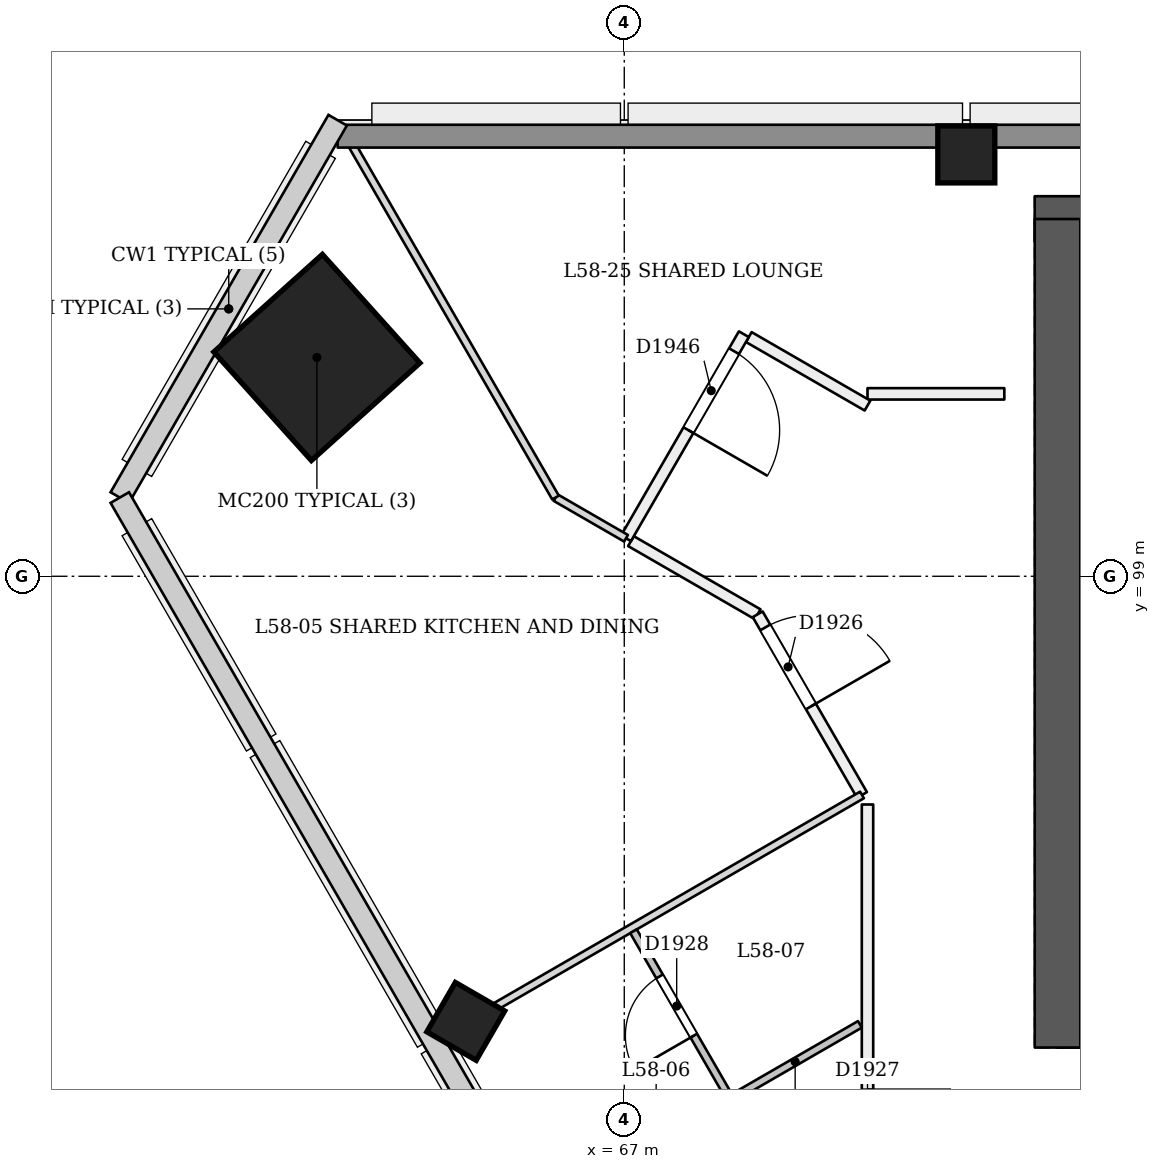
"""IFC4 building model, lengths in metres.
Left out: names, types, materials, properties, quantities, classifications, styles, units other than length and angle.
Written with IfcOpenShell. Run it as: python <this file> out.ifc"""

import sys

from ifc_helpers import new_model, si_unit, direction, frame, frame_2d, origin, origin_2d, place, context, subcontext, project, spatial, rectangle, extrude, element, fill, save


model = new_model("IFC4")
c1 = context("Model", 3, precision=1e-05, world=origin(), true_north=direction((0.0, 1.0)))
c2 = subcontext(c1, "Body", "Model", "MODEL_VIEW")
j1 = project(units=[si_unit("LENGTHUNIT", "METRE"), si_unit("PLANEANGLEUNIT", "RADIAN")], contexts=[c1])
p1 = place(None, origin())
s1 = spatial("IfcSite", under=j1, at=p1, CompositionType="ELEMENT")
p2 = place(p1, origin())
s2 = spatial("IfcBuilding", under=s1, at=p2, CompositionType="ELEMENT")
p3 = place(p2, frame((0.0, 0.0, 226.6)))
s3 = spatial("IfcBuildingStorey", under=s2, at=p3, CompositionType="ELEMENT", Elevation=226.6)
p4 = place(p3, frame((72.7, 93.1, 0.0), z_axis=(0.0, 0.0, 1.0), x_axis=(1.0, 0.0, 0.0)))
e1 = element("IfcWall", 1, at=p4, inside=s3, PredefinedType="SHEAR", context=c2, shape_type="SweptSolid", body=[
    extrude(rectangle(XDim=24.9, YDim=0.6, at=frame_2d((12.45, 0.0))), origin(), (0.0, 0.0, 1.0), 3.6),
])
p5 = place(p4, frame((1.1, 0.0, 0.0)))
e2 = element("IfcOpeningElement", 2, at=p5, cuts=e1, PredefinedType="OPENING", context=c2, shape_type="SweptSolid", body=[
    extrude(rectangle(XDim=1.2, YDim=2.1, at=frame_2d((0.6, 1.05))), frame((0.0, 0.311, 0.0), z_axis=(0.0, -1.0, 0.0), x_axis=(1.0, 0.0, 0.0)), (0.0, 0.0, 1.0), 0.621),
])
p6 = place(p4, frame((3.3, 0.0, 0.0)))
e3 = element("IfcOpeningElement", 3, at=p6, cuts=e1, PredefinedType="OPENING", context=c2, shape_type="SweptSolid", body=[
    extrude(rectangle(XDim=1.2, YDim=2.1, at=frame_2d((0.6, 1.05))), frame((0.0, 0.311, 0.0), z_axis=(0.0, -1.0, 0.0), x_axis=(1.0, 0.0, 0.0)), (0.0, 0.0, 1.0), 0.621),
])
p7 = place(p4, frame((13.3, 0.0, 0.0)))
e4 = element("IfcOpeningElement", 4, at=p7, cuts=e1, PredefinedType="OPENING", context=c2, shape_type="SweptSolid", body=[
    extrude(rectangle(XDim=1.2, YDim=2.1, at=frame_2d((0.6, 1.05))), frame((0.0, 0.311, 0.0), z_axis=(0.0, -1.0, 0.0), x_axis=(1.0, 0.0, 0.0)), (0.0, 0.0, 1.0), 0.621),
])
p8 = place(p4, frame((15.762, 0.0, 0.0)))
e5 = element("IfcOpeningElement", 5, at=p8, cuts=e1, PredefinedType="OPENING", context=c2, shape_type="SweptSolid", body=[
    extrude(rectangle(XDim=1.0, YDim=2.1, at=frame_2d((0.5, 1.05))), frame((0.0, 0.311, 0.0), z_axis=(0.0, -1.0, 0.0), x_axis=(1.0, 0.0, 0.0)), (0.0, 0.0, 1.0), 0.621),
])
p9 = place(p4, frame((18.2, 0.0, 0.0)))
e6 = element("IfcOpeningElement", 6, at=p9, cuts=e1, PredefinedType="OPENING", context=c2, shape_type="SweptSolid", body=[
    extrude(rectangle(XDim=1.0, YDim=2.1, at=frame_2d((0.5, 1.05))), frame((0.0, 0.311, 0.0), z_axis=(0.0, -1.0, 0.0), x_axis=(1.0, 0.0, 0.0)), (0.0, 0.0, 1.0), 0.621),
])
p10 = place(p4, frame((20.55, 0.0, 0.0)))
e7 = element("IfcOpeningElement", 7, at=p10, cuts=e1, PredefinedType="OPENING", context=c2, shape_type="SweptSolid", body=[
    extrude(rectangle(XDim=1.0, YDim=2.1, at=frame_2d((0.5, 1.05))), frame((0.0, 0.311, 0.0), z_axis=(0.0, -1.0, 0.0), x_axis=(1.0, 0.0, 0.0)), (0.0, 0.0, 1.0), 0.621),
])
p11 = place(p4, frame((22.837, 0.0, 0.0)))
e8 = element("IfcOpeningElement", 8, at=p11, cuts=e1, PredefinedType="OPENING", context=c2, shape_type="SweptSolid", body=[
    extrude(rectangle(XDim=1.0, YDim=2.1, at=frame_2d((0.5, 1.05))), frame((0.0, 0.311, 0.0), z_axis=(0.0, -1.0, 0.0), x_axis=(1.0, 0.0, 0.0)), (0.0, 0.0, 1.0), 0.621),
])
p12 = place(p3, frame((97.3, 103.7, 0.0), z_axis=(0.0, 0.0, 1.0), x_axis=(-1.0, 0.0, 0.0)))
e9 = element("IfcWall", 9, at=p12, inside=s3, PredefinedType="SHEAR", context=c2, shape_type="SweptSolid", body=[
    extrude(rectangle(XDim=24.9, YDim=0.6, at=frame_2d((12.45, 0.0))), origin(), (0.0, 0.0, 1.0), 3.6),
])
p13 = place(p3, frame((72.7, 103.7, 0.0), z_axis=(0.0, 0.0, 1.0), x_axis=(0.0, -1.0, 0.0)))
e10 = element("IfcWall", 10, at=p13, inside=s3, PredefinedType="SHEAR", context=c2, shape_type="SweptSolid", body=[
    extrude(rectangle(XDim=10.9, YDim=0.6, at=frame_2d((5.45, 0.0))), origin(), (0.0, 0.0, 1.0), 3.6),
])
p14 = place(p3, frame((62.922, 101.868, 0.0), z_axis=(0.028403721265, 0.009287135593, 0.999553389135), x_axis=(-0.866201877506, 0.49929479911, 0.019975259356)))
e11 = element("IfcColumn", 11, at=p14, inside=s3, PredefinedType="COLUMN", context=c2, shape_type="SweptSolid", body=[
    extrude(rectangle(XDim=1.92, YDim=1.92, at=origin_2d()), origin(), (0.0, 0.0, 1.0), 3.602),
])
p15 = place(p3, frame((71.5, 104.55, 0.0), z_axis=(0.0, 0.0, 1.0), x_axis=(1.0, 0.0, 0.0)))
e12 = element("IfcColumn", 12, at=p15, inside=s3, PredefinedType="COLUMN", context=c2, shape_type="SweptSolid", body=[
    extrude(rectangle(XDim=0.75, YDim=0.75, at=origin_2d()), origin(), (0.0, 0.0, 1.0), 3.6),
])
p16 = place(p3, frame((64.888, 93.097, -0.023), z_axis=(0.02215369191, 0.038413282303, 0.999016333038), x_axis=(-0.865361987983, -0.499673744646, 0.038402847096)))
e13 = element("IfcColumn", 13, at=p16, inside=s3, PredefinedType="COLUMN", context=c2, shape_type="SweptSolid", body=[
    extrude(rectangle(XDim=0.75, YDim=0.75, at=origin_2d()), origin(), (0.0, 0.0, 1.0), 3.604),
])
p17 = place(p3, frame((67.088, 99.462, 0.0), z_axis=(0.0, 0.0, 1.0), x_axis=(0.866033512162, -0.499985955615, 0.0)))
e14 = element("IfcWall", 14, at=p17, inside=s3, PredefinedType="PARTITIONING", context=c2, shape_type="SweptSolid", body=[
    extrude(rectangle(XDim=1.925, YDim=0.15, at=frame_2d((0.962, 0.0))), origin(), (0.0, 0.0, 1.0), 3.2),
])
p18 = place(p3, frame((68.755, 98.5, 0.0), z_axis=(0.0, 0.0, 1.0), x_axis=(0.500061224174, -0.865990053105, 0.0)))
e15 = element("IfcWall", 15, at=p18, inside=s3, PredefinedType="PARTITIONING", context=c2, shape_type="SweptSolid", body=[
    extrude(rectangle(XDim=2.745, YDim=0.15, at=frame_2d((1.373, 0.0))), origin(), (0.0, 0.0, 1.0), 3.2),
])
p19 = place(p18, frame((0.2, 0.0, 0.0)))
e16 = element("IfcOpeningElement", 16, at=p19, cuts=e15, PredefinedType="OPENING", context=c2, shape_type="SweptSolid", body=[
    extrude(rectangle(XDim=1.2, YDim=2.1, at=frame_2d((0.6, 1.05))), frame((0.0, 0.085, 0.0), z_axis=(0.0, -1.0, 0.0), x_axis=(1.0, 0.0, 0.0)), (0.0, 0.0, 1.0), 0.171),
])
p20 = place(p3, frame((70.2, 95.998, 0.0), z_axis=(0.0, 0.0, 1.0), x_axis=(0.0, -1.0, 0.0)))
e17 = element("IfcWall", 17, at=p20, inside=s3, PredefinedType="PARTITIONING", context=c2, shape_type="SweptSolid", body=[
    extrude(rectangle(XDim=5.798, YDim=0.15, at=frame_2d((2.899, 0.0))), origin(), (0.0, 0.0, 1.0), 3.2),
])
p21 = place(p20, frame((3.752, 0.0, 0.0)))
e18 = element("IfcOpeningElement", 18, at=p21, cuts=e17, PredefinedType="OPENING", context=c2, shape_type="SweptSolid", body=[
    extrude(rectangle(XDim=1.1, YDim=2.1, at=frame_2d((0.55, 1.05))), frame((0.0, 0.085, 0.0), z_axis=(0.0, -1.0, 0.0), x_axis=(1.0, 0.0, 0.0)), (0.0, 0.0, 1.0), 0.171),
])
p22 = place(p3, frame((72.0, 101.4, 0.0), z_axis=(0.0, 0.0, 1.0), x_axis=(-1.0, 0.0, 0.0)))
e19 = element("IfcWall", 19, at=p22, inside=s3, PredefinedType="PARTITIONING", context=c2, shape_type="SweptSolid", body=[
    extrude(rectangle(XDim=1.8, YDim=0.15, at=frame_2d((0.9, 0.0))), origin(), (0.0, 0.0, 1.0), 3.2),
])
p23 = place(p3, frame((70.2, 101.245, 0.0), z_axis=(0.0, 0.0, 1.0), x_axis=(-0.865984934964, 0.500070087503, 0.0)))
e20 = element("IfcWall", 20, at=p23, inside=s3, PredefinedType="PARTITIONING", context=c2, shape_type="SweptSolid", body=[
    extrude(rectangle(XDim=1.803, YDim=0.15, at=frame_2d((0.902, 0.0))), origin(), (0.0, 0.0, 1.0), 3.2),
])
p24 = place(p3, frame((68.573, 102.185, 0.0), z_axis=(0.0, 0.0, 1.0), x_axis=(-0.500026960575, -0.86600983753, 0.0)))
e21 = element("IfcWall", 21, at=p24, inside=s3, PredefinedType="PARTITIONING", context=c2, shape_type="SweptSolid", body=[
    extrude(rectangle(XDim=3.1, YDim=0.15, at=frame_2d((1.55, 0.0))), origin(), (0.0, 0.0, 1.0), 3.2),
])
p25 = place(p24, frame((0.258, 0.0, 0.0)))
e22 = element("IfcOpeningElement", 22, at=p25, cuts=e21, PredefinedType="OPENING", context=c2, shape_type="SweptSolid", body=[
    extrude(rectangle(XDim=1.2, YDim=2.1, at=frame_2d((0.6, 1.05))), frame((0.0, 0.085, 0.0), z_axis=(0.0, -1.0, 0.0), x_axis=(1.0, 0.0, 0.0)), (0.0, 0.0, 1.0), 0.171),
])
p26 = place(p3, frame((64.585, 92.923, 0.0), z_axis=(0.0, 0.0, 1.0), x_axis=(0.866018518567, 0.500011925357, 0.0)))
e23 = element("IfcWall", 23, at=p26, inside=s3, PredefinedType="PARTITIONING", context=c2, shape_type="SweptSolid", body=[
    extrude(rectangle(XDim=6.4, YDim=0.1, at=frame_2d((3.2, 0.0))), origin(), (0.0, 0.0, 1.0), 2.7),
])
p27 = place(p3, frame((67.023, 99.5, 0.0), z_axis=(0.0, 0.0, 1.0), x_axis=(-0.866018596809, 0.500011789842, 0.0)))
e24 = element("IfcWall", 24, at=p27, inside=s3, PredefinedType="PARTITIONING", context=c2, shape_type="SweptSolid", body=[
    extrude(rectangle(XDim=1.071, YDim=0.1, at=frame_2d((0.536, 0.0))), origin(), (0.0, 0.0, 1.0), 3.2),
])
p28 = place(p3, frame((66.095, 100.036, 0.0), z_axis=(0.0, 0.0, 1.0), x_axis=(-0.49999586752, 0.86602778966, 0.0)))
e25 = element("IfcWall", 25, at=p28, inside=s3, PredefinedType="PARTITIONING", context=c2, shape_type="SweptSolid", body=[
    extrude(rectangle(XDim=5.617, YDim=0.1, at=frame_2d((2.808, 0.0))), origin(), (0.0, 0.0, 1.0), 2.7),
])
p29 = place(p3, frame((70.1, 93.105, 0.0), z_axis=(0.0, 0.0, 1.0), x_axis=(-0.866065717678, -0.499930167786, 0.0)))
e26 = element("IfcWall", 26, at=p29, inside=s3, PredefinedType="PARTITIONING", context=c2, shape_type="SweptSolid", body=[
    extrude(rectangle(XDim=1.967, YDim=0.1, at=frame_2d((0.983, 0.0))), origin(), (0.0, 0.0, 1.0), 3.2),
])
p30 = place(p3, frame((68.396, 92.121, 0.0), z_axis=(0.0, 0.0, 1.0), x_axis=(-0.499990435942, 0.866030925526, 0.0)))
e27 = element("IfcWall", 27, at=p30, inside=s3, PredefinedType="PARTITIONING", context=c2, shape_type="SweptSolid", body=[
    extrude(rectangle(XDim=2.55, YDim=0.1, at=frame_2d((1.275, 0.0))), origin(), (0.0, 0.0, 1.0), 3.2),
])
p31 = place(p30, frame((0.964, 0.0, 0.0)))
e28 = element("IfcOpeningElement", 28, at=p31, cuts=e27, PredefinedType="OPENING", context=c2, shape_type="SweptSolid", body=[
    extrude(rectangle(XDim=0.9, YDim=2.1, at=frame_2d((0.45, 1.05))), frame((0.0, 0.061, 0.0), z_axis=(0.0, -1.0, 0.0), x_axis=(1.0, 0.0, 0.0)), (0.0, 0.0, 1.0), 0.121),
])
p32 = place(p3, frame((63.229, 104.79, 0.0), z_axis=(0.0, 0.0, 1.0), x_axis=(1.0, 0.0, 0.0)))
e29 = element("IfcWall", 29, at=p32, inside=s3, PredefinedType="SOLIDWALL", context=c2, shape_type="SweptSolid", body=[
    extrude(rectangle(XDim=43.542, YDim=0.3, at=frame_2d((21.771, 0.0))), origin(), (0.0, 0.0, 1.0), 2.7),
])
p33 = place(p19, origin())
e30 = element("IfcDoor", 30, at=p33, inside=s3, OperationType="SINGLE_SWING_RIGHT", PredefinedType="NOTDEFINED", context=c2, shape_type="SweptSolid", body=[
    extrude(rectangle(XDim=1.2, YDim=2.1, at=frame_2d((0.6, 1.05))), frame((0.0, 0.025, 0.0), z_axis=(0.0, -1.0, 0.0), x_axis=(1.0, 0.0, 0.0)), (0.0, 0.0, 1.0), 0.05),
])
fill(e16, e30)
p34 = place(p31, origin())
e31 = element("IfcDoor", 31, at=p34, inside=s3, OperationType="SINGLE_SWING_LEFT", PredefinedType="NOTDEFINED", context=c2, shape_type="SweptSolid", body=[
    extrude(rectangle(XDim=0.9, YDim=2.1, at=frame_2d((0.45, 1.05))), frame((0.0, 0.025, 0.0), z_axis=(0.0, -1.0, 0.0), x_axis=(1.0, 0.0, 0.0)), (0.0, 0.0, 1.0), 0.05),
])
fill(e28, e31)
p35 = place(p25, origin())
e32 = element("IfcDoor", 32, at=p35, inside=s3, OperationType="SINGLE_SWING_RIGHT", PredefinedType="NOTDEFINED", context=c2, shape_type="SweptSolid", body=[
    extrude(rectangle(XDim=1.2, YDim=2.1, at=frame_2d((0.6, 1.05))), frame((0.0, 0.025, 0.0), z_axis=(0.0, -1.0, 0.0), x_axis=(1.0, 0.0, 0.0)), (0.0, 0.0, 1.0), 0.05),
])
fill(e22, e32)
save(model, sys.argv[1])
